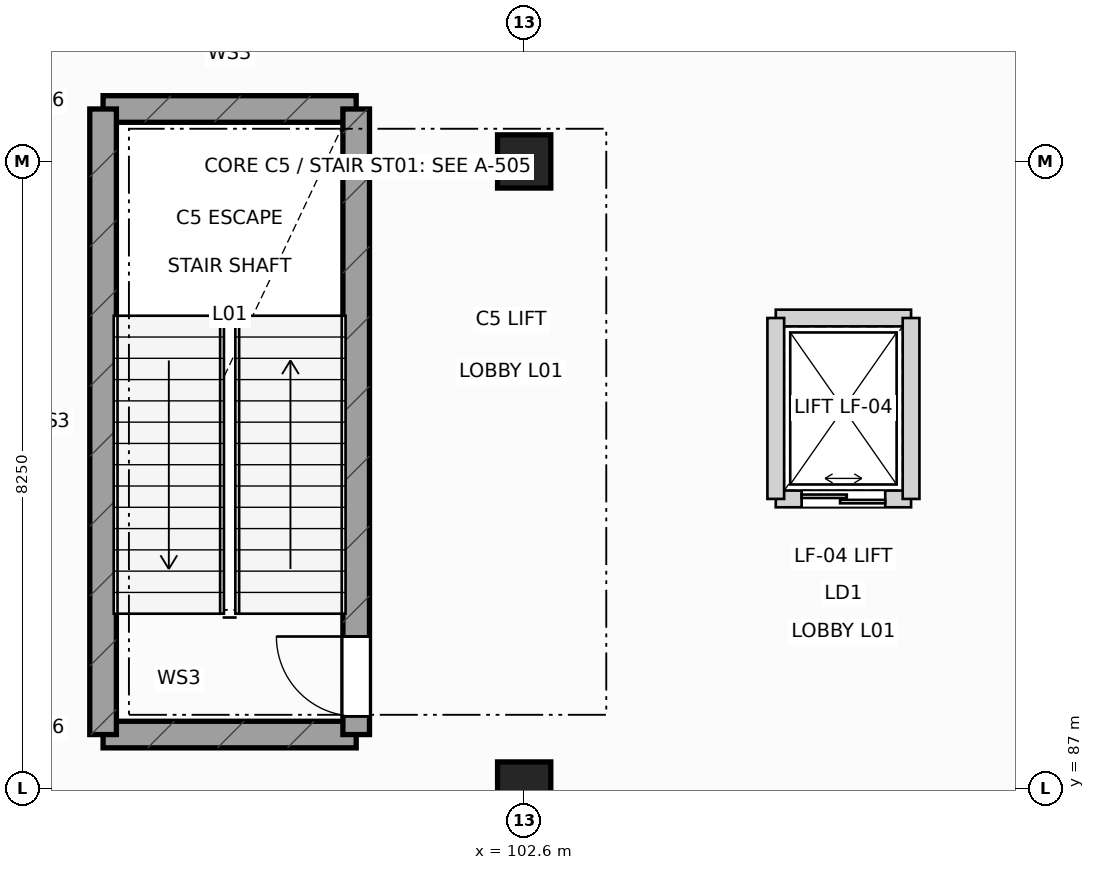
"""IFC4 building model, lengths in metres.
Left out: names, types, materials, properties, quantities, classifications, styles, units other than length and angle.
Written with IfcOpenShell. Run it as: python <this file> out.ifc"""

import sys

from ifc_helpers import new_model, si_unit, direction, frame, frame_2d, origin, origin_2d, place, context, subcontext, project, spatial, rectangle, extrude, element, fill, save


model = new_model("IFC4")
c1 = context("Model", 3, precision=1e-05, world=origin(), true_north=direction((0.0, 1.0)))
c2 = subcontext(c1, "Body", "Model", "MODEL_VIEW")
j1 = project(units=[si_unit("LENGTHUNIT", "METRE"), si_unit("PLANEANGLEUNIT", "RADIAN")], contexts=[c1])
p1 = place(None, origin())
s1 = spatial("IfcSite", under=j1, at=p1, CompositionType="ELEMENT")
p2 = place(p1, origin())
s2 = spatial("IfcBuilding", under=s1, at=p2, CompositionType="ELEMENT")
p3 = place(p2, frame((0.0, 0.0, 6.0)))
s3 = spatial("IfcBuildingStorey", under=s2, at=p3, CompositionType="ELEMENT", Elevation=6.0)
for number, where, z_axis, x_axis in (
    (1, (102.6, 87.0, 0.0), (0.0, 0.0, 1.0), (1.0, 0.0, 0.0)),
    (2, (102.6, 95.25, 0.0), (0.0, 0.0, 1.0), (1.0, 0.0, 0.0)),
):
    element("IfcColumn", number, at=place(p3, frame(where, z_axis=z_axis, x_axis=x_axis)), inside=s3, PredefinedType="COLUMN", context=c2, shape_type="SweptSolid", body=[
        extrude(rectangle(XDim=0.7, YDim=0.7, at=origin_2d()), origin(), (0.0, 0.0, 1.0), 5.4),
    ])
for number, where, z_axis, x_axis in (
    (3, (97.06, 87.71, 0.0), (0.0, 0.0, 1.0), (1.0, 0.0, 0.0)),
    (4, (97.06, 95.94, 0.0), (0.0, 0.0, 1.0), (1.0, 0.0, 0.0)),
):
    element("IfcWall", number, at=place(p3, frame(where, z_axis=z_axis, x_axis=x_axis)), inside=s3, PredefinedType="SHEAR", context=c2, shape_type="SweptSolid", body=[
        extrude(rectangle(XDim=3.33, YDim=0.35, at=frame_2d((1.665, 0.0))), origin(), (0.0, 0.0, 1.0), 5.05),
    ])
p4 = place(p3, frame((97.06, 87.71, 0.0), z_axis=(0.0, 0.0, 1.0), x_axis=(0.0, 1.0, 0.0)))
e5 = element("IfcWall", 5, at=p4, inside=s3, PredefinedType="SHEAR", context=c2, shape_type="SweptSolid", body=[
    extrude(rectangle(XDim=8.23, YDim=0.35, at=frame_2d((4.115, 0.0))), origin(), (0.0, 0.0, 1.0), 5.05),
])
p5 = place(p3, frame((100.39, 87.71, 0.0), z_axis=(0.0, 0.0, 1.0), x_axis=(0.0, 1.0, 0.0)))
e6 = element("IfcWall", 6, at=p5, inside=s3, PredefinedType="SHEAR", context=c2, shape_type="SweptSolid", body=[
    extrude(rectangle(XDim=8.23, YDim=0.35, at=frame_2d((4.115, 0.0))), origin(), (0.0, 0.0, 1.0), 5.05),
])
p6 = place(p5, frame((0.24, 0.0, 0.0)))
e7 = element("IfcOpeningElement", 7, at=p6, cuts=e6, PredefinedType="OPENING", context=c2, shape_type="SweptSolid", body=[
    extrude(rectangle(XDim=1.05, YDim=2.18, at=frame_2d((0.525, 1.09))), frame((0.0, 0.185, 0.0), z_axis=(0.0, -1.0, 0.0), x_axis=(1.0, 0.0, 0.0)), (0.0, 0.0, 1.0), 0.37),
])
p7 = place(p3, frame((105.91, 90.81, 0.0), z_axis=(0.0, 0.0, 1.0), x_axis=(1.0, 0.0, 0.0)))
e8 = element("IfcWall", 8, at=p7, inside=s3, PredefinedType="PARTITIONING", context=c2, shape_type="SweptSolid", body=[
    extrude(rectangle(XDim=1.78, YDim=0.22, at=frame_2d((0.89, 0.0))), origin(), (0.0, 0.0, 1.0), 5.015),
])
p8 = place(p7, frame((0.34, 0.0, 0.0)))
e9 = element("IfcOpeningElement", 9, at=p8, cuts=e8, PredefinedType="OPENING", context=c2, shape_type="SweptSolid", body=[
    extrude(rectangle(XDim=1.1, YDim=2.18, at=frame_2d((0.55, 1.09))), frame((0.0, 0.12, 0.0), z_axis=(0.0, -1.0, 0.0), x_axis=(1.0, 0.0, 0.0)), (0.0, 0.0, 1.0), 0.24),
])
p9 = place(p3, frame((105.91, 93.19, 0.0), z_axis=(0.0, 0.0, 1.0), x_axis=(1.0, 0.0, 0.0)))
e10 = element("IfcWall", 10, at=p9, inside=s3, PredefinedType="PARTITIONING", context=c2, shape_type="SweptSolid", body=[
    extrude(rectangle(XDim=1.78, YDim=0.22, at=frame_2d((0.89, 0.0))), origin(), (0.0, 0.0, 1.0), 5.015),
])
for number, where, z_axis, x_axis in (
    (11, (105.91, 90.81, 0.0), (0.0, 0.0, 1.0), (0.0, 1.0, 0.0)),
    (12, (107.69, 90.81, 0.0), (0.0, 0.0, 1.0), (0.0, 1.0, 0.0)),
):
    element("IfcWall", number, at=place(p3, frame(where, z_axis=z_axis, x_axis=x_axis)), inside=s3, PredefinedType="PARTITIONING", context=c2, shape_type="SweptSolid", body=[
        extrude(rectangle(XDim=2.38, YDim=0.22, at=frame_2d((1.19, 0.0))), origin(), (0.0, 0.0, 1.0), 5.015),
    ])
p10 = place(p6, origin())
e13 = element("IfcDoor", 13, at=p10, inside=s3, OperationType="SINGLE_SWING_RIGHT", PredefinedType="DOOR", context=c2, shape_type="SweptSolid", body=[
    extrude(rectangle(XDim=1.05, YDim=2.18, at=frame_2d((0.525, 1.09))), frame((0.0, 0.025, 0.0), z_axis=(0.0, -1.0, 0.0), x_axis=(1.0, 0.0, 0.0)), (0.0, 0.0, 1.0), 0.05),
])
fill(e7, e13)
p11 = place(p8, origin())
e14 = element("IfcDoor", 14, at=p11, inside=s3, OperationType="DOUBLE_DOOR_SLIDING", PredefinedType="DOOR", context=c2, shape_type="SweptSolid", body=[
    extrude(rectangle(XDim=1.1, YDim=2.18, at=frame_2d((0.55, 1.09))), frame((0.0, 0.025, 0.0), z_axis=(0.0, -1.0, 0.0), x_axis=(1.0, 0.0, 0.0)), (0.0, 0.0, 1.0), 0.05),
])
fill(e9, e14)
save(model, sys.argv[1])
